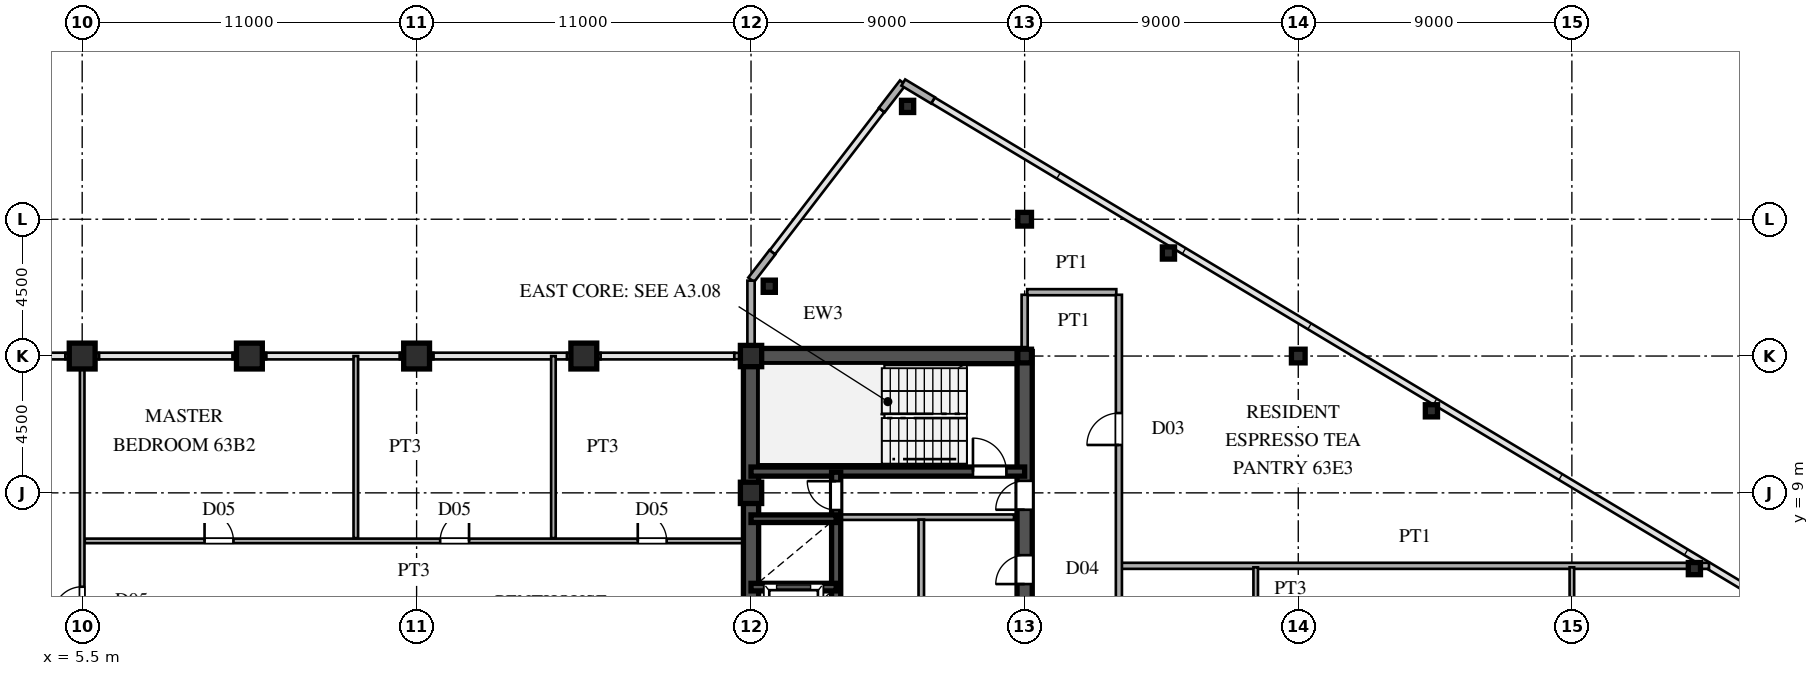
"""IFC4 building model, lengths in metres.
Left out: names, types, materials, properties, quantities, classifications, styles, units other than length and angle.
Written with IfcOpenShell. Run it as: python <this file> out.ifc"""

import sys

from ifc_helpers import new_model, si_unit, direction, frame, frame_2d, origin, origin_2d, place, context, subcontext, project, spatial, rectangle, hollow_rectangle, i_section, extrude, source, transform, mapped, element, fill, save


model = new_model("IFC4")
c1 = context("Model", 3, precision=1e-05, world=origin(), true_north=direction((0.0, 1.0)))
c2 = subcontext(c1, "Body", "Model", "MODEL_VIEW")
j1 = project(units=[si_unit("LENGTHUNIT", "METRE"), si_unit("PLANEANGLEUNIT", "RADIAN")], contexts=[c1])
p1 = place(None, origin())
s1 = spatial("IfcSite", under=j1, at=p1, CompositionType="ELEMENT")
p2 = place(p1, origin())
s2 = spatial("IfcBuilding", under=s1, at=p2, CompositionType="ELEMENT")
p3 = place(p2, frame((0.0, 0.0, 239.4)))
s3 = spatial("IfcBuildingStorey", under=s2, at=p3, CompositionType="ELEMENT", Elevation=239.4)
m1 = source(origin(), c2, "Body", "SweptSolid", [
    extrude(hollow_rectangle(XDim=0.7, YDim=0.7, WallThickness=0.03, at=origin_2d()), origin(), (0.0, 0.0, 1.0), 3.75),
])
for number, where, z_axis, x_axis in (
    (1, (27.5, 9.0, 0.0), (0.0, 0.0, 1.0), (1.0, 0.0, 0.0)),
    (2, (27.5, 13.5, 0.0), (0.0, 0.0, 1.0), (1.0, 0.0, 0.0)),
):
    element("IfcColumn", number, at=place(p3, frame(where, z_axis=z_axis, x_axis=x_axis)), inside=s3, PredefinedType="COLUMN", context=c2, shape_type="MappedRepresentation", body=[
        mapped(m1, transform((0.0, 0.0, 0.0), scale=1.0)),
    ])
m2 = source(origin(), c2, "Body", "SweptSolid", [
    extrude(i_section(OverallWidth=0.45, OverallDepth=0.45, WebThickness=0.016, FlangeThickness=0.025, at=origin_2d()), origin(), (0.0, 0.0, 1.0), 3.75),
])
for number, where, z_axis, x_axis in (
    (3, (36.5, 13.5, 0.0), (0.0, 0.0, 1.0), (1.0, 0.0, 0.0)),
    (4, (36.5, 18.0, 0.0), (0.0, 0.0, 1.0), (1.0, 0.0, 0.0)),
    (5, (45.5, 13.5, 0.0), (0.0, 0.0, 1.0), (1.0, 0.0, 0.0)),
):
    element("IfcColumn", number, at=place(p3, frame(where, z_axis=z_axis, x_axis=x_axis)), inside=s3, PredefinedType="COLUMN", context=c2, shape_type="MappedRepresentation", body=[
        mapped(m2, transform((0.0, 0.0, 0.0), scale=1.0)),
    ])
m3 = source(origin(), c2, "Body", "SweptSolid", [
    extrude(hollow_rectangle(XDim=0.4, YDim=0.4, WallThickness=0.016, at=origin_2d()), origin(), (0.0, 0.0, 1.0), 3.75),
])
for number, where, z_axis, x_axis in (
    (6, (32.65, 21.71, 0.0), (0.0, 0.0, 1.0), (1.0, 0.0, 0.0)),
    (7, (28.1, 15.796, 0.0), (0.0, 0.0, 1.0), (1.0, 0.0, 0.0)),
    (8, (41.23, 16.889, 0.0), (0.0, 0.0, 1.0), (1.0, 0.0, 0.0)),
    (9, (49.88, 11.699, 0.0), (0.0, 0.0, 1.0), (1.0, 0.0, 0.0)),
    (10, (58.53, 6.509, 0.0), (0.0, 0.0, 1.0), (1.0, 0.0, 0.0)),
):
    element("IfcColumn", number, at=place(p3, frame(where, z_axis=z_axis, x_axis=x_axis)), inside=s3, PredefinedType="COLUMN", context=c2, shape_type="MappedRepresentation", body=[
        mapped(m3, transform((0.0, 0.0, 0.0), scale=1.0)),
    ])
m4 = source(origin(), c2, "Body", "SweptSolid", [
    extrude(hollow_rectangle(XDim=0.85, YDim=0.85, WallThickness=0.036, at=origin_2d()), origin(), (0.0, 0.0, 1.0), 3.75),
])
for number, where, z_axis, x_axis in (
    (11, (5.5, 13.5, 0.0), (0.0, 0.0, 1.0), (1.0, 0.0, 0.0)),
    (12, (11.0, 13.5, 0.0), (0.0, 0.0, 1.0), (1.0, 0.0, 0.0)),
    (13, (16.5, 13.5, 0.0), (0.0, 0.0, 1.0), (1.0, 0.0, 0.0)),
    (14, (22.0, 13.5, 0.0), (0.0, 0.0, 1.0), (1.0, 0.0, 0.0)),
):
    element("IfcColumn", number, at=place(p3, frame(where, z_axis=z_axis, x_axis=x_axis)), inside=s3, PredefinedType="COLUMN", context=c2, shape_type="MappedRepresentation", body=[
        mapped(m4, transform((0.0, 0.0, 0.0), scale=1.0)),
    ])
for number, where, z_axis, x_axis in (
    (15, (33.486, 21.908, 0.0), (0.0, 0.0, 1.0), (-0.857, 0.515, 0.0)),
    (16, (32.494, 22.492, 0.0), (0.0, 0.0, 1.0), (-0.61, -0.793, 0.0)),
    (17, (28.201, 16.912, 0.0), (0.0, 0.0, 1.0), (-0.61, -0.793, 0.0)),
):
    element("IfcWall", number, at=place(p3, frame(where, z_axis=z_axis, x_axis=x_axis)), inside=s3, PredefinedType="SOLIDWALL", context=c2, shape_type="SweptSolid", body=[
        extrude(rectangle(XDim=1.14, YDim=0.24, at=frame_2d((0.57, 0.0))), origin(), (0.0, 0.0, 1.0), 3.53),
    ])
p4 = place(p3, frame((27.5, 13.755, 0.0), z_axis=(0.0, 0.0, 1.0), x_axis=(0.0, 1.0, 0.0)))
e18 = element("IfcWall", 18, at=p4, inside=s3, PredefinedType="SOLIDWALL", context=c2, shape_type="SweptSolid", body=[
    extrude(rectangle(XDim=0.62, YDim=0.24, at=frame_2d((0.31, 0.0))), origin(), (0.0, 0.0, 1.0), 3.03),
])
p5 = place(p3, frame((27.5, 14.375, 0.0), z_axis=(0.0, 0.0, 1.0), x_axis=(0.0, 1.0, 0.0)))
e19 = element("IfcWall", 19, at=p5, inside=s3, PredefinedType="SOLIDWALL", context=c2, shape_type="SweptSolid", body=[
    extrude(rectangle(XDim=1.605, YDim=0.24, at=frame_2d((0.803, 0.0))), origin(), (0.0, 0.0, 1.0), 3.53),
])
for number, where, z_axis, x_axis in (
    (20, (4.95, 13.5, 0.0), (0.0, 0.0, 1.0), (1.0, 0.0, 0.0)),
    (21, (10.45, 13.5, 0.0), (0.0, 0.0, 1.0), (1.0, 0.0, 0.0)),
    (22, (15.95, 13.5, 0.0), (0.0, 0.0, 1.0), (1.0, 0.0, 0.0)),
    (23, (21.45, 13.5, 0.0), (0.0, 0.0, 1.0), (1.0, 0.0, 0.0)),
):
    element("IfcWall", number, at=place(p3, frame(where, z_axis=z_axis, x_axis=x_axis)), inside=s3, PredefinedType="SOLIDWALL", context=c2, shape_type="SweptSolid", body=[
        extrude(rectangle(XDim=1.1, YDim=0.21, at=frame_2d((0.55, 0.0))), origin(), (0.0, 0.0, 1.0), 3.03),
    ])
p6 = place(p3, frame((26.95, 13.5, 0.0), z_axis=(0.0, 0.0, 1.0), x_axis=(1.0, 0.0, 0.0)))
e24 = element("IfcWall", 24, at=p6, inside=s3, PredefinedType="SOLIDWALL", context=c2, shape_type="SweptSolid", body=[
    extrude(rectangle(XDim=0.54, YDim=0.21, at=frame_2d((0.27, 0.0))), origin(), (0.0, 0.0, 1.0), 3.03),
])
p7 = place(p3, frame((27.5, 1.3, 0.0), z_axis=(0.0, 0.0, 1.0), x_axis=(0.0, 1.0, 0.0)))
e25 = element("IfcWall", 25, at=p7, inside=s3, PredefinedType="SHEAR", context=c2, shape_type="SweptSolid", body=[
    extrude(rectangle(XDim=12.2, YDim=0.5, at=frame_2d((6.1, 0.0))), origin(), (0.0, 0.0, 1.0), 3.53),
])
p8 = place(p3, frame((27.5, 13.5, 0.0), z_axis=(0.0, 0.0, 1.0), x_axis=(1.0, 0.0, 0.0)))
e26 = element("IfcWall", 26, at=p8, inside=s3, PredefinedType="SHEAR", context=c2, shape_type="SweptSolid", body=[
    extrude(rectangle(XDim=9.0, YDim=0.5, at=frame_2d((4.5, 0.0))), origin(), (0.0, 0.0, 1.0), 3.53),
])
p9 = place(p3, frame((36.5, 8.2, 0.0), z_axis=(0.0, 0.0, 1.0), x_axis=(0.0, 1.0, 0.0)))
e27 = element("IfcWall", 27, at=p9, inside=s3, PredefinedType="SHEAR", context=c2, shape_type="SweptSolid", body=[
    extrude(rectangle(XDim=5.45, YDim=0.5, at=frame_2d((2.725, 0.0))), origin(), (0.0, 0.0, 1.0), 3.53),
])
p10 = place(p9, frame((0.245, 0.0, 0.0)))
e28 = element("IfcOpeningElement", 28, at=p10, cuts=e27, PredefinedType="OPENING", context=c2, shape_type="SweptSolid", body=[
    extrude(rectangle(XDim=0.95, YDim=2.15, at=frame_2d((0.475, 1.075))), frame((0.0, 0.26, 0.0), z_axis=(0.0, -1.0, 0.0), x_axis=(1.0, 0.0, 0.0)), (0.0, 0.0, 1.0), 0.52),
])
p11 = place(p3, frame((36.5, 4.75, 0.0), z_axis=(0.0, 0.0, 1.0), x_axis=(0.0, 1.0, 0.0)))
e29 = element("IfcWall", 29, at=p11, inside=s3, PredefinedType="SHEAR", context=c2, shape_type="SweptSolid", body=[
    extrude(rectangle(XDim=3.45, YDim=0.5, at=frame_2d((1.725, 0.0))), origin(), (0.0, 0.0, 1.0), 3.53),
])
p12 = place(p11, frame((1.25, 0.0, 0.0)))
e30 = element("IfcOpeningElement", 30, at=p12, cuts=e29, PredefinedType="OPENING", context=c2, shape_type="SweptSolid", body=[
    extrude(rectangle(XDim=0.95, YDim=2.15, at=frame_2d((0.475, 1.075))), frame((0.0, 0.26, 0.0), z_axis=(0.0, -1.0, 0.0), x_axis=(1.0, 0.0, 0.0)), (0.0, 0.0, 1.0), 0.52),
])
p13 = place(p3, frame((27.5, 9.7, 0.0), z_axis=(0.0, 0.0, 1.0), x_axis=(1.0, 0.0, 0.0)))
e31 = element("IfcWall", 31, at=p13, inside=s3, PredefinedType="SHEAR", context=c2, shape_type="SweptSolid", body=[
    extrude(rectangle(XDim=9.0, YDim=0.3, at=frame_2d((4.5, 0.0))), origin(), (0.0, 0.0, 1.0), 3.53),
])
p14 = place(p13, frame((7.3, 0.0, 0.0)))
e32 = element("IfcOpeningElement", 32, at=p14, cuts=e31, PredefinedType="OPENING", context=c2, shape_type="SweptSolid", body=[
    extrude(rectangle(XDim=1.1, YDim=2.2, at=frame_2d((0.55, 1.1))), frame((0.0, 0.16, 0.0), z_axis=(0.0, -1.0, 0.0), x_axis=(1.0, 0.0, 0.0)), (0.0, 0.0, 1.0), 0.32),
])
for number, where, z_axis, x_axis in (
    (33, (27.5, 5.9, 0.0), (0.0, 0.0, 1.0), (1.0, 0.0, 0.0)),
    (34, (27.5, 8.15, 0.0), (0.0, 0.0, 1.0), (1.0, 0.0, 0.0)),
):
    element("IfcWall", number, at=place(p3, frame(where, z_axis=z_axis, x_axis=x_axis)), inside=s3, PredefinedType="SHEAR", context=c2, shape_type="SweptSolid", body=[
        extrude(rectangle(XDim=2.8, YDim=0.25, at=frame_2d((1.4, 0.0))), origin(), (0.0, 0.0, 1.0), 3.53),
    ])
p15 = place(p3, frame((30.3, 3.6, 0.0), z_axis=(0.0, 0.0, 1.0), x_axis=(0.0, 1.0, 0.0)))
e35 = element("IfcWall", 35, at=p15, inside=s3, PredefinedType="SHEAR", context=c2, shape_type="SweptSolid", body=[
    extrude(rectangle(XDim=2.3, YDim=0.3, at=frame_2d((1.15, 0.0))), origin(), (0.0, 0.0, 1.0), 3.53),
])
p16 = place(p15, frame((0.6, 0.0, 0.0)))
e36 = element("IfcOpeningElement", 36, at=p16, cuts=e35, PredefinedType="OPENING", context=c2, shape_type="SweptSolid", body=[
    extrude(rectangle(XDim=1.1, YDim=2.2, at=frame_2d((0.55, 1.1))), frame((0.0, 0.16, 0.0), z_axis=(0.0, -1.0, 0.0), x_axis=(1.0, 0.0, 0.0)), (0.0, 0.0, 1.0), 0.32),
])
p17 = place(p3, frame((30.3, 5.9, 0.0), z_axis=(0.0, 0.0, 1.0), x_axis=(0.0, 1.0, 0.0)))
e37 = element("IfcWall", 37, at=p17, inside=s3, PredefinedType="SHEAR", context=c2, shape_type="SweptSolid", body=[
    extrude(rectangle(XDim=2.25, YDim=0.3, at=frame_2d((1.125, 0.0))), origin(), (0.0, 0.0, 1.0), 3.53),
])
p18 = place(p3, frame((30.3, 8.15, 0.0), z_axis=(0.0, 0.0, 1.0), x_axis=(0.0, 1.0, 0.0)))
e38 = element("IfcWall", 38, at=p18, inside=s3, PredefinedType="SHEAR", context=c2, shape_type="SweptSolid", body=[
    extrude(rectangle(XDim=1.53, YDim=0.3, at=frame_2d((0.765, 0.0))), origin(), (0.0, 0.0, 1.0), 3.53),
])
p19 = place(p18, frame((0.285, 0.0, 0.0)))
e39 = element("IfcOpeningElement", 39, at=p19, cuts=e38, PredefinedType="OPENING", context=c2, shape_type="SweptSolid", body=[
    extrude(rectangle(XDim=0.95, YDim=2.15, at=frame_2d((0.475, 1.075))), frame((0.0, 0.16, 0.0), z_axis=(0.0, -1.0, 0.0), x_axis=(1.0, 0.0, 0.0)), (0.0, 0.0, 1.0), 0.32),
])
p20 = place(p3, frame((30.45, 8.2, 0.0), z_axis=(0.0, 0.0, 1.0), x_axis=(1.0, 0.0, 0.0)))
e40 = element("IfcWall", 40, at=p20, inside=s3, PredefinedType="PARTITIONING", context=c2, shape_type="SweptSolid", body=[
    extrude(rectangle(XDim=5.7, YDim=0.18, at=frame_2d((2.85, 0.0))), origin(), (0.0, 0.0, 1.0), 3.53),
])
p21 = place(p3, frame((33.1, 1.38, 0.0), z_axis=(0.0, 0.0, 1.0), x_axis=(0.0, 1.0, 0.0)))
e41 = element("IfcWall", 41, at=p21, inside=s3, PredefinedType="PARTITIONING", context=c2, shape_type="SweptSolid", body=[
    extrude(rectangle(XDim=6.74, YDim=0.18, at=frame_2d((3.37, 0.0))), origin(), (0.0, 0.0, 1.0), 3.53),
])
p22 = place(p3, frame((39.68, 6.6, 0.0), z_axis=(0.0, 0.0, 1.0), x_axis=(1.0, 0.0, 0.0)))
e42 = element("IfcWall", 42, at=p22, inside=s3, PredefinedType="PARTITIONING", context=c2, shape_type="SweptSolid", body=[
    extrude(rectangle(XDim=19.33, YDim=0.2, at=frame_2d((9.665, 0.0))), origin(), (0.0, 0.0, 1.0), 3.53),
])
p23 = place(p3, frame((5.585, 7.42, 0.0), z_axis=(0.0, 0.0, 1.0), x_axis=(1.0, 0.0, 0.0)))
e43 = element("IfcWall", 43, at=p23, inside=s3, PredefinedType="PARTITIONING", context=c2, shape_type="SweptSolid", body=[
    extrude(rectangle(XDim=21.66, YDim=0.15, at=frame_2d((10.83, 0.0))), origin(), (0.0, 0.0, 1.0), 3.53),
])
p24 = place(p23, frame((3.94, 0.0, 0.0)))
e44 = element("IfcOpeningElement", 44, at=p24, cuts=e43, PredefinedType="OPENING", context=c2, shape_type="SweptSolid", body=[
    extrude(rectangle(XDim=0.95, YDim=2.15, at=frame_2d((0.475, 1.075))), frame((0.0, 0.085, 0.0), z_axis=(0.0, -1.0, 0.0), x_axis=(1.0, 0.0, 0.0)), (0.0, 0.0, 1.0), 0.17),
])
p25 = place(p23, frame((11.69, 0.0, 0.0)))
e45 = element("IfcOpeningElement", 45, at=p25, cuts=e43, PredefinedType="OPENING", context=c2, shape_type="SweptSolid", body=[
    extrude(rectangle(XDim=0.95, YDim=2.15, at=frame_2d((0.475, 1.075))), frame((0.0, 0.085, 0.0), z_axis=(0.0, -1.0, 0.0), x_axis=(1.0, 0.0, 0.0)), (0.0, 0.0, 1.0), 0.17),
])
p26 = place(p23, frame((18.19, 0.0, 0.0)))
e46 = element("IfcOpeningElement", 46, at=p26, cuts=e43, PredefinedType="OPENING", context=c2, shape_type="SweptSolid", body=[
    extrude(rectangle(XDim=0.95, YDim=2.15, at=frame_2d((0.475, 1.075))), frame((0.0, 0.085, 0.0), z_axis=(0.0, -1.0, 0.0), x_axis=(1.0, 0.0, 0.0)), (0.0, 0.0, 1.0), 0.17),
])
p27 = place(p3, frame((36.585, 15.6, 0.0), z_axis=(0.0, 0.0, 1.0), x_axis=(1.0, 0.0, 0.0)))
e47 = element("IfcWall", 47, at=p27, inside=s3, PredefinedType="PARTITIONING", context=c2, shape_type="SweptSolid", body=[
    extrude(rectangle(XDim=2.93, YDim=0.2, at=frame_2d((1.465, 0.0))), origin(), (0.0, 0.0, 1.0), 3.53),
])
p28 = place(p3, frame((5.5, 1.435, 0.0), z_axis=(0.0, 0.0, 1.0), x_axis=(0.0, 1.0, 0.0)))
e48 = element("IfcWall", 48, at=p28, inside=s3, PredefinedType="PARTITIONING", context=c2, shape_type="SweptSolid", body=[
    extrude(rectangle(XDim=11.955, YDim=0.15, at=frame_2d((5.978, 0.0))), origin(), (0.0, 0.0, 1.0), 2.43),
])
p29 = place(p28, frame((3.528, 0.0, 0.0)))
e49 = element("IfcOpeningElement", 49, at=p29, cuts=e48, PredefinedType="OPENING", context=c2, shape_type="SweptSolid", body=[
    extrude(rectangle(XDim=0.95, YDim=2.15, at=frame_2d((0.475, 1.075))), frame((0.0, 0.085, 0.0), z_axis=(0.0, -1.0, 0.0), x_axis=(1.0, 0.0, 0.0)), (0.0, 0.0, 1.0), 0.17),
])
for number, where, z_axis, x_axis in (
    (50, (14.5, 7.51, 0.0), (0.0, 0.0, 1.0), (0.0, 1.0, 0.0)),
    (51, (21.0, 7.51, 0.0), (0.0, 0.0, 1.0), (0.0, 1.0, 0.0)),
):
    element("IfcWall", number, at=place(p3, frame(where, z_axis=z_axis, x_axis=x_axis)), inside=s3, PredefinedType="PARTITIONING", context=c2, shape_type="SweptSolid", body=[
        extrude(rectangle(XDim=5.99, YDim=0.15, at=frame_2d((2.995, 0.0))), origin(), (0.0, 0.0, 1.0), 3.53),
    ])
p30 = place(p3, frame((36.5, 13.755, 0.0), z_axis=(0.0, 0.0, 1.0), x_axis=(0.0, 1.0, 0.0)))
e52 = element("IfcWall", 52, at=p30, inside=s3, PredefinedType="PARTITIONING", context=c2, shape_type="SweptSolid", body=[
    extrude(rectangle(XDim=1.76, YDim=0.2, at=frame_2d((0.88, 0.0))), origin(), (0.0, 0.0, 1.0), 2.93),
])
p31 = place(p3, frame((39.6, -15.515, 0.0), z_axis=(0.0, 0.0, 1.0), x_axis=(0.0, 1.0, 0.0)))
e53 = element("IfcWall", 53, at=p31, inside=s3, PredefinedType="PARTITIONING", context=c2, shape_type="SweptSolid", body=[
    extrude(rectangle(XDim=31.03, YDim=0.2, at=frame_2d((15.515, 0.0))), origin(), (0.0, 0.0, 1.0), 3.53),
])
p32 = place(p31, frame((4.09, 0.0, 0.0)))
e54 = element("IfcOpeningElement", 54, at=p32, cuts=e53, PredefinedType="OPENING", context=c2, shape_type="SweptSolid", body=[
    extrude(rectangle(XDim=1.05, YDim=2.25, at=frame_2d((0.525, 1.125))), frame((0.0, 0.11, 0.0), z_axis=(0.0, -1.0, 0.0), x_axis=(1.0, 0.0, 0.0)), (0.0, 0.0, 1.0), 0.22),
])
p33 = place(p31, frame((14.998, 0.0, 0.0)))
e55 = element("IfcOpeningElement", 55, at=p33, cuts=e53, PredefinedType="OPENING", context=c2, shape_type="SweptSolid", body=[
    extrude(rectangle(XDim=1.05, YDim=2.25, at=frame_2d((0.525, 1.125))), frame((0.0, 0.11, 0.0), z_axis=(0.0, -1.0, 0.0), x_axis=(1.0, 0.0, 0.0)), (0.0, 0.0, 1.0), 0.22),
])
p34 = place(p31, frame((26.09, 0.0, 0.0)))
e56 = element("IfcOpeningElement", 56, at=p34, cuts=e53, PredefinedType="OPENING", context=c2, shape_type="SweptSolid", body=[
    extrude(rectangle(XDim=1.05, YDim=2.25, at=frame_2d((0.525, 1.125))), frame((0.0, 0.11, 0.0), z_axis=(0.0, -1.0, 0.0), x_axis=(1.0, 0.0, 0.0)), (0.0, 0.0, 1.0), 0.22),
])
p35 = place(p3, frame((44.1, 2.812, 0.0), z_axis=(0.0, 0.0, 1.0), x_axis=(0.0, 1.0, 0.0)))
e57 = element("IfcWall", 57, at=p35, inside=s3, PredefinedType="PARTITIONING", context=c2, shape_type="SweptSolid", body=[
    extrude(rectangle(XDim=3.738, YDim=0.15, at=frame_2d((1.869, 0.0))), origin(), (0.0, 0.0, 1.0), 3.53),
])
p36 = place(p3, frame((54.5, -6.15, 0.0), z_axis=(0.0, 0.0, 1.0), x_axis=(0.0, 1.0, 0.0)))
e58 = element("IfcWall", 58, at=p36, inside=s3, PredefinedType="PARTITIONING", context=c2, shape_type="SweptSolid", body=[
    extrude(rectangle(XDim=12.7, YDim=0.15, at=frame_2d((6.35, 0.0))), origin(), (0.0, 0.0, 1.0), 2.93),
])
p37 = place(p36, frame((5.875, 0.0, 0.0)))
e59 = element("IfcOpeningElement", 59, at=p37, cuts=e58, PredefinedType="OPENING", context=c2, shape_type="SweptSolid", body=[
    extrude(rectangle(XDim=0.95, YDim=2.15, at=frame_2d((0.475, 1.075))), frame((0.0, 0.085, 0.0), z_axis=(0.0, -1.0, 0.0), x_axis=(1.0, 0.0, 0.0)), (0.0, 0.0, 1.0), 0.17),
])
m5 = source(origin(), c2, "Body", "SweptSolid", [
    extrude(rectangle(XDim=0.95, YDim=2.15, at=frame_2d((0.475, 1.075))), frame((0.0, 0.025, 0.0), z_axis=(0.0, -1.0, 0.0), x_axis=(1.0, 0.0, 0.0)), (0.0, 0.0, 1.0), 0.05),
])
p38 = place(p10, origin())
e60 = element("IfcDoor", 60, at=p38, inside=s3, OperationType="SINGLE_SWING_LEFT", PredefinedType="DOOR", context=c2, shape_type="MappedRepresentation", body=[
    mapped(m5, transform((0.0, 0.0, 0.0), scale=1.0)),
])
fill(e28, e60)
p39 = place(p12, origin())
e61 = element("IfcDoor", 61, at=p39, inside=s3, OperationType="SINGLE_SWING_LEFT", PredefinedType="DOOR", context=c2, shape_type="MappedRepresentation", body=[
    mapped(m5, transform((0.0, 0.0, 0.0), scale=1.0)),
])
fill(e30, e61)
m6 = source(origin(), c2, "Body", "SweptSolid", [
    extrude(rectangle(XDim=1.1, YDim=2.2, at=frame_2d((0.55, 1.1))), frame((0.0, 0.025, 0.0), z_axis=(0.0, -1.0, 0.0), x_axis=(1.0, 0.0, 0.0)), (0.0, 0.0, 1.0), 0.05),
])
p40 = place(p14, origin())
e62 = element("IfcDoor", 62, at=p40, inside=s3, OperationType="SINGLE_SWING_LEFT", PredefinedType="DOOR", context=c2, shape_type="MappedRepresentation", body=[
    mapped(m6, transform((0.0, 0.0, 0.0), scale=1.0)),
])
fill(e32, e62)
p41 = place(p19, origin())
e63 = element("IfcDoor", 63, at=p41, inside=s3, OperationType="SINGLE_SWING_RIGHT", PredefinedType="DOOR", context=c2, shape_type="MappedRepresentation", body=[
    mapped(m5, transform((0.0, 0.0, 0.0), scale=1.0)),
])
fill(e39, e63)
m7 = source(origin(), c2, "Body", "SweptSolid", [
    extrude(rectangle(XDim=0.95, YDim=2.15, at=frame_2d((0.475, 1.075))), frame((0.0, 0.025, 0.0), z_axis=(0.0, -1.0, 0.0), x_axis=(1.0, 0.0, 0.0)), (0.0, 0.0, 1.0), 0.05),
])
p42 = place(p24, origin())
e64 = element("IfcDoor", 64, at=p42, inside=s3, OperationType="SINGLE_SWING_LEFT", PredefinedType="DOOR", context=c2, shape_type="MappedRepresentation", body=[
    mapped(m7, transform((0.0, 0.0, 0.0), scale=1.0)),
])
fill(e44, e64)
p43 = place(p25, origin())
e65 = element("IfcDoor", 65, at=p43, inside=s3, OperationType="SINGLE_SWING_RIGHT", PredefinedType="DOOR", context=c2, shape_type="MappedRepresentation", body=[
    mapped(m7, transform((0.0, 0.0, 0.0), scale=1.0)),
])
fill(e45, e65)
p44 = place(p26, origin())
e66 = element("IfcDoor", 66, at=p44, inside=s3, OperationType="SINGLE_SWING_LEFT", PredefinedType="DOOR", context=c2, shape_type="MappedRepresentation", body=[
    mapped(m7, transform((0.0, 0.0, 0.0), scale=1.0)),
])
fill(e46, e66)
p45 = place(p29, origin())
e67 = element("IfcDoor", 67, at=p45, inside=s3, OperationType="SINGLE_SWING_LEFT", PredefinedType="DOOR", context=c2, shape_type="MappedRepresentation", body=[
    mapped(m7, transform((0.0, 0.0, 0.0), scale=1.0)),
])
fill(e49, e67)
m8 = source(origin(), c2, "Body", "SweptSolid", [
    extrude(rectangle(XDim=1.05, YDim=2.25, at=frame_2d((0.525, 1.125))), frame((0.0, 0.025, 0.0), z_axis=(0.0, -1.0, 0.0), x_axis=(1.0, 0.0, 0.0)), (0.0, 0.0, 1.0), 0.05),
])
p46 = place(p34, origin())
e68 = element("IfcDoor", 68, at=p46, inside=s3, OperationType="SINGLE_SWING_LEFT", PredefinedType="DOOR", context=c2, shape_type="MappedRepresentation", body=[
    mapped(m8, transform((0.0, 0.0, 0.0), scale=1.0)),
])
fill(e56, e68)
save(model, sys.argv[1])
